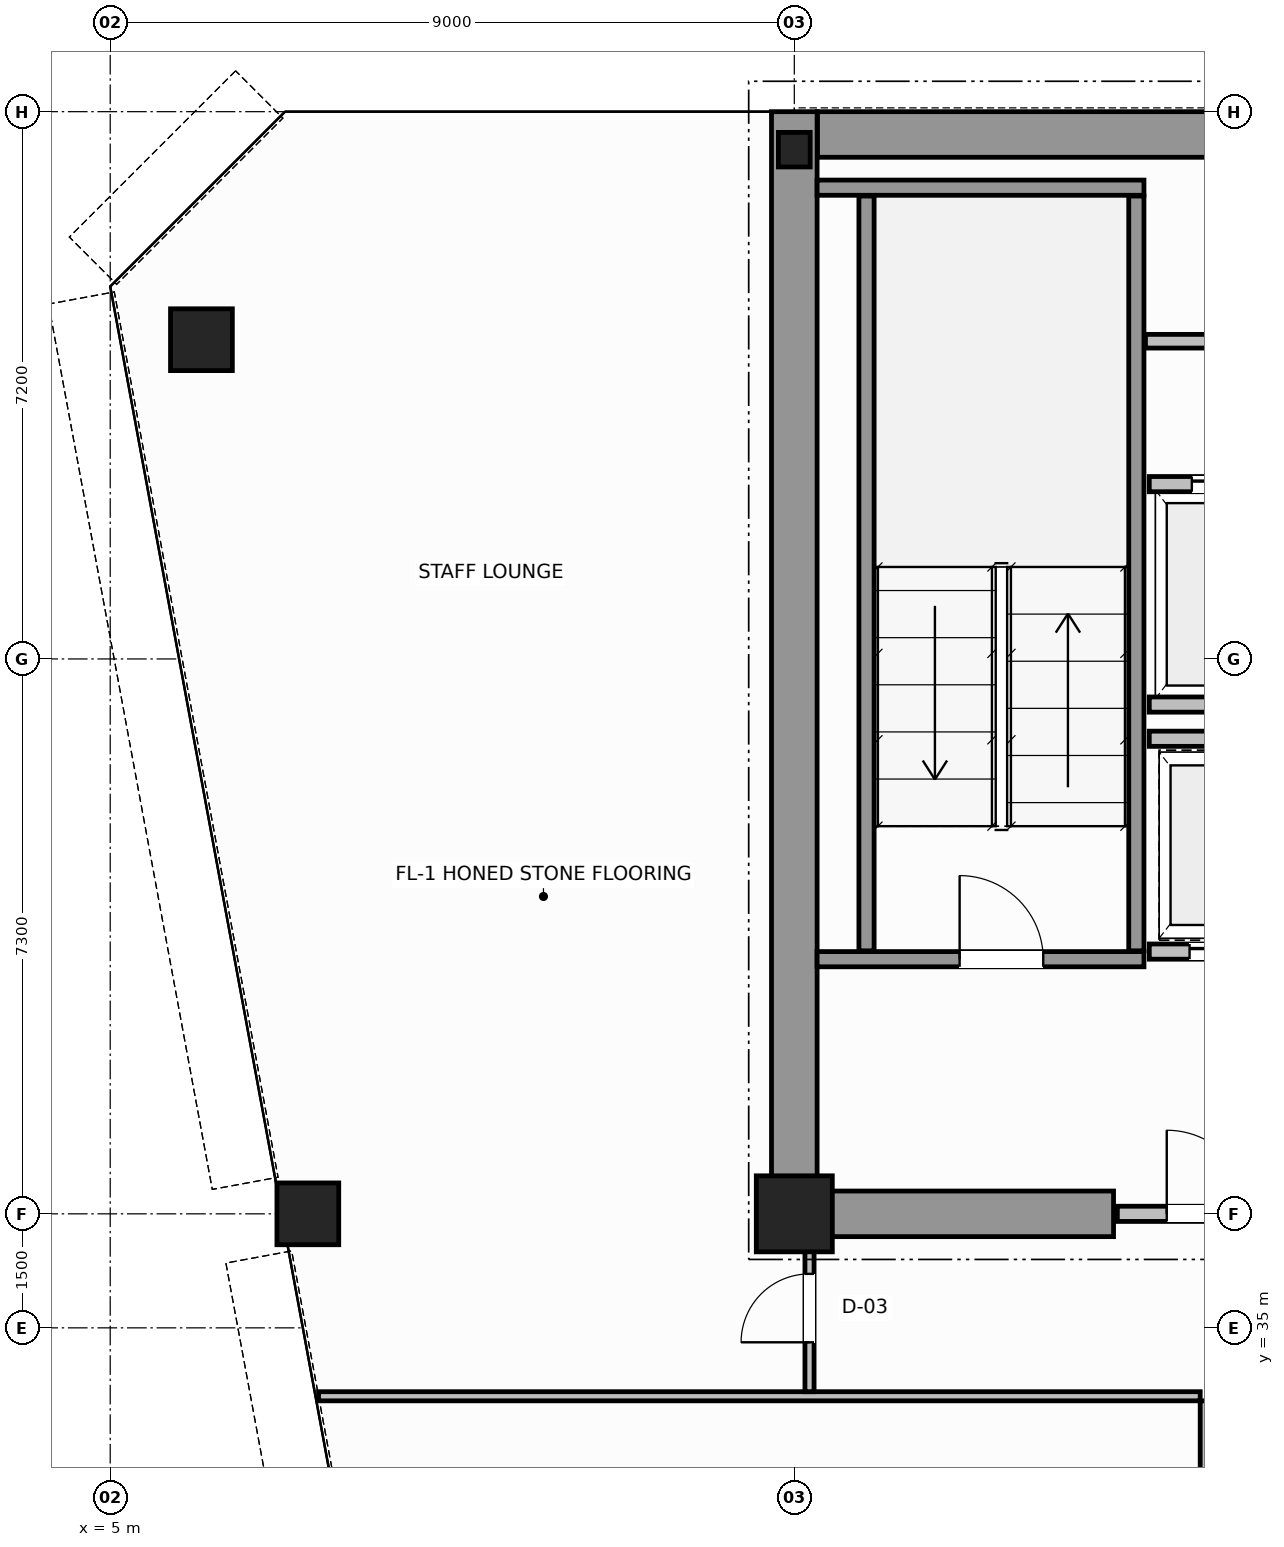
"""IFC4 building model, lengths in metres.
Left out: names, types, materials, properties, quantities, classifications, styles, units other than length and angle.
Written with IfcOpenShell. Run it as: python <this file> out.ifc"""

import sys

from ifc_helpers import new_model, si_unit, direction, frame, frame_2d, origin, origin_2d, place, context, subcontext, project, spatial, rectangle, hollow_circle, i_section, extrude, source, transform, mapped, element, fill, save


model = new_model("IFC4")
c1 = context("Model", 3, precision=1e-05, world=origin(), true_north=direction((0.0, 1.0)))
c2 = subcontext(c1, "Body", "Model", "MODEL_VIEW")
j1 = project(units=[si_unit("LENGTHUNIT", "METRE"), si_unit("PLANEANGLEUNIT", "RADIAN")], contexts=[c1])
p1 = place(None, origin())
s1 = spatial("IfcSite", under=j1, at=p1, CompositionType="ELEMENT")
p2 = place(p1, origin())
s2 = spatial("IfcBuilding", under=s1, at=p2, CompositionType="ELEMENT")
p3 = place(p2, frame((0.0, 0.0, 210.8)))
s3 = spatial("IfcBuildingStorey", under=s2, at=p3, CompositionType="ELEMENT", Elevation=210.8)
m1 = source(origin(), c2, "Body", "SweptSolid", [
    extrude(rectangle(XDim=1.0, YDim=1.0, at=origin_2d()), origin(), (0.0, 0.0, 1.0), 3.8),
])
p4 = place(p3, frame((14.0, 36.5, 0.0), z_axis=(0.0, 0.0, 1.0), x_axis=(1.0, 0.0, 0.0)))
e1 = element("IfcColumn", 1, at=p4, inside=s3, PredefinedType="COLUMN", context=c2, shape_type="MappedRepresentation", body=[
    mapped(m1, transform((0.0, 0.0, 0.0), scale=1.0)),
])
m2 = source(origin(), c2, "Body", "SweptSolid", [
    extrude(i_section(OverallWidth=0.418, OverallDepth=0.455, WebThickness=0.042, FlangeThickness=0.058, FilletRadius=0.015, at=origin_2d()), origin(), (0.0, 0.0, 1.0), 3.8),
])
p5 = place(p3, frame((14.0, 50.5, 0.0), z_axis=(0.0, 0.0, 1.0), x_axis=(1.0, 0.0, 0.0)))
e2 = element("IfcColumn", 2, at=p5, inside=s3, PredefinedType="COLUMN", context=c2, shape_type="MappedRepresentation", body=[
    mapped(m2, transform((0.0, 0.0, 0.0), scale=1.0)),
])
m3 = source(origin(), c2, "Body", "SweptSolid", [
    extrude(hollow_circle(Radius=0.406, WallThickness=0.04, at=origin_2d()), origin(), (0.0, 0.0, 1.0), 3.8),
])
for number, where, z_axis, x_axis in (
    (3, (6.2, 48.0, 0.0), (0.0, 0.0, 1.0), (1.0, 0.0, 0.0)),
    (4, (7.6, 36.5, 0.0), (0.0, 0.0, 1.0), (1.0, 0.0, 0.0)),
):
    element("IfcColumn", number, at=place(p3, frame(where, z_axis=z_axis, x_axis=x_axis)), inside=s3, PredefinedType="COLUMN", context=c2, shape_type="MappedRepresentation", body=[
        mapped(m3, transform((0.0, 0.0, 0.0), scale=1.0)),
    ])
p6 = place(p3, frame((14.304, 50.7, 0.0), z_axis=(0.0, 0.0, 1.0), x_axis=(1.0, 0.0, 0.0)))
e5 = element("IfcWall", 5, at=p6, inside=s3, PredefinedType="SHEAR", context=c2, shape_type="SweptSolid", body=[
    extrude(rectangle(XDim=19.694, YDim=0.6, at=frame_2d((9.847, 0.0))), origin(), (0.0, 0.0, 1.0), 3.8),
])
p7 = place(p3, frame((14.0, 36.5, 0.0), z_axis=(0.0, 0.0, 1.0), x_axis=(0.0, 1.0, 0.0)))
e6 = element("IfcWall", 6, at=p7, inside=s3, PredefinedType="SHEAR", context=c2, shape_type="SweptSolid", body=[
    extrude(rectangle(XDim=14.5, YDim=0.6, at=frame_2d((7.25, 0.0))), origin(), (0.0, 0.0, 1.0), 3.8),
])
p8 = place(p3, frame((14.32, 36.5, 0.0), z_axis=(0.0, 0.0, 1.0), x_axis=(1.0, 0.0, 0.0)))
e7 = element("IfcWall", 7, at=p8, inside=s3, PredefinedType="SHEAR", context=c2, shape_type="SweptSolid", body=[
    extrude(rectangle(XDim=3.88, YDim=0.6, at=frame_2d((1.94, 0.0))), origin(), (0.0, 0.0, 1.0), 2.58),
])
p9 = place(p3, frame((14.3, 39.85, 0.0), z_axis=(0.0, 0.0, 1.0), x_axis=(1.0, 0.0, 0.0)))
e8 = element("IfcWall", 8, at=p9, inside=s3, PredefinedType="SOLIDWALL", context=c2, shape_type="SweptSolid", body=[
    extrude(rectangle(XDim=4.3, YDim=0.2, at=frame_2d((2.15, 0.0))), origin(), (0.0, 0.0, 1.0), 3.8),
])
p10 = place(p9, frame((1.875, 0.0, 0.0)))
e9 = element("IfcOpeningElement", 9, at=p10, cuts=e8, PredefinedType="OPENING", context=c2, shape_type="SweptSolid", body=[
    extrude(rectangle(XDim=1.1, YDim=2.15, at=frame_2d((0.55, 1.075))), frame((0.0, 0.11, 0.0), z_axis=(0.0, -1.0, 0.0), x_axis=(1.0, 0.0, 0.0)), (0.0, 0.0, 1.0), 0.22),
])
p11 = place(p3, frame((14.3, 50.0, 0.0), z_axis=(0.0, 0.0, 1.0), x_axis=(1.0, 0.0, 0.0)))
e10 = element("IfcWall", 10, at=p11, inside=s3, PredefinedType="SOLIDWALL", context=c2, shape_type="SweptSolid", body=[
    extrude(rectangle(XDim=4.3, YDim=0.2, at=frame_2d((2.15, 0.0))), origin(), (0.0, 0.0, 1.0), 3.8),
])
for number, where, z_axis, x_axis in (
    (11, (14.95, 39.96, 0.0), (0.0, 0.0, 1.0), (0.0, 1.0, 0.0)),
    (12, (18.5, 39.96, 0.0), (0.0, 0.0, 1.0), (0.0, 1.0, 0.0)),
):
    element("IfcWall", number, at=place(p3, frame(where, z_axis=z_axis, x_axis=x_axis)), inside=s3, PredefinedType="SOLIDWALL", context=c2, shape_type="SweptSolid", body=[
        extrude(rectangle(XDim=9.93, YDim=0.2, at=frame_2d((4.965, 0.0))), origin(), (0.0, 0.0, 1.0), 3.8),
    ])
p12 = place(p3, frame((18.25, 36.5, 0.0), z_axis=(0.0, 0.0, 1.0), x_axis=(1.0, 0.0, 0.0)))
e13 = element("IfcWall", 13, at=p12, inside=s3, PredefinedType="SOLIDWALL", context=c2, shape_type="SweptSolid", body=[
    extrude(rectangle(XDim=2.47, YDim=0.2, at=frame_2d((1.235, 0.0))), origin(), (0.0, 0.0, 1.0), 2.57),
])
p13 = place(p12, frame((0.65, 0.0, 0.0)))
e14 = element("IfcOpeningElement", 14, at=p13, cuts=e13, PredefinedType="OPENING", context=c2, shape_type="SweptSolid", body=[
    extrude(rectangle(XDim=1.1, YDim=2.15, at=frame_2d((0.55, 1.075))), frame((0.0, 0.11, 0.0), z_axis=(0.0, -1.0, 0.0), x_axis=(1.0, 0.0, 0.0)), (0.0, 0.0, 1.0), 0.22),
])
p14 = place(p3, frame((18.67, 46.1, 0.0), z_axis=(0.0, 0.0, 1.0), x_axis=(1.0, 0.0, 0.0)))
e15 = element("IfcWall", 15, at=p14, inside=s3, PredefinedType="SOLIDWALL", context=c2, shape_type="SweptSolid", body=[
    extrude(rectangle(XDim=2.22, YDim=0.2, at=frame_2d((1.11, 0.0))), origin(), (0.0, 0.0, 1.0), 3.58),
])
p15 = place(p14, frame((0.56, 0.0, 0.0)))
e16 = element("IfcOpeningElement", 16, at=p15, cuts=e15, PredefinedType="OPENING", context=c2, shape_type="SweptSolid", body=[
    extrude(rectangle(XDim=1.1, YDim=2.15, at=frame_2d((0.55, 1.075))), frame((0.0, 0.11, 0.0), z_axis=(0.0, -1.0, 0.0), x_axis=(1.0, 0.0, 0.0)), (0.0, 0.0, 1.0), 0.22),
])
p16 = place(p3, frame((18.67, 43.2, 0.0), z_axis=(0.0, 0.0, 1.0), x_axis=(1.0, 0.0, 0.0)))
e17 = element("IfcWall", 17, at=p16, inside=s3, PredefinedType="SOLIDWALL", context=c2, shape_type="SweptSolid", body=[
    extrude(rectangle(XDim=2.22, YDim=0.2, at=frame_2d((1.11, 0.0))), origin(), (0.0, 0.0, 1.0), 3.58),
])
p17 = place(p3, frame((18.67, 39.95, 0.0), z_axis=(0.0, 0.0, 1.0), x_axis=(1.0, 0.0, 0.0)))
e18 = element("IfcWall", 18, at=p17, inside=s3, PredefinedType="SOLIDWALL", context=c2, shape_type="SweptSolid", body=[
    extrude(rectangle(XDim=2.16, YDim=0.2, at=frame_2d((1.08, 0.0))), origin(), (0.0, 0.0, 1.0), 3.58),
])
p18 = place(p17, frame((0.53, 0.0, 0.0)))
e19 = element("IfcOpeningElement", 19, at=p18, cuts=e18, PredefinedType="OPENING", context=c2, shape_type="SweptSolid", body=[
    extrude(rectangle(XDim=1.1, YDim=2.15, at=frame_2d((0.55, 1.075))), frame((0.0, 0.11, 0.0), z_axis=(0.0, -1.0, 0.0), x_axis=(1.0, 0.0, 0.0)), (0.0, 0.0, 1.0), 0.22),
])
p19 = place(p3, frame((18.67, 42.75, 0.0), z_axis=(0.0, 0.0, 1.0), x_axis=(1.0, 0.0, 0.0)))
e20 = element("IfcWall", 20, at=p19, inside=s3, PredefinedType="SOLIDWALL", context=c2, shape_type="SweptSolid", body=[
    extrude(rectangle(XDim=2.16, YDim=0.2, at=frame_2d((1.08, 0.0))), origin(), (0.0, 0.0, 1.0), 3.58),
])
p20 = place(p3, frame((18.62, 47.98, 0.0), z_axis=(0.0, 0.0, 1.0), x_axis=(1.0, 0.0, 0.0)))
e21 = element("IfcWall", 21, at=p20, inside=s3, PredefinedType="PLUMBINGWALL", context=c2, shape_type="SweptSolid", body=[
    extrude(rectangle(XDim=20.06, YDim=0.18, at=frame_2d((10.03, 0.0))), origin(), (0.0, 0.0, 1.0), 3.58),
])
p21 = place(p20, frame((3.5, 0.0, 0.0)))
e22 = element("IfcOpeningElement", 22, at=p21, cuts=e21, PredefinedType="OPENING", context=c2, shape_type="SweptSolid", body=[
    extrude(rectangle(XDim=0.9, YDim=2.15, at=frame_2d((0.45, 1.075))), frame((0.0, 0.1, 0.0), z_axis=(0.0, -1.0, 0.0), x_axis=(1.0, 0.0, 0.0)), (0.0, 0.0, 1.0), 0.2),
])
p22 = place(p20, frame((10.8, 0.0, 0.0)))
e23 = element("IfcOpeningElement", 23, at=p22, cuts=e21, PredefinedType="OPENING", context=c2, shape_type="SweptSolid", body=[
    extrude(rectangle(XDim=0.9, YDim=2.15, at=frame_2d((0.45, 1.075))), frame((0.0, 0.1, 0.0), z_axis=(0.0, -1.0, 0.0), x_axis=(1.0, 0.0, 0.0)), (0.0, 0.0, 1.0), 0.2),
])
p23 = place(p20, frame((16.8, 0.0, 0.0)))
e24 = element("IfcOpeningElement", 24, at=p23, cuts=e21, PredefinedType="OPENING", context=c2, shape_type="SweptSolid", body=[
    extrude(rectangle(XDim=0.9, YDim=2.15, at=frame_2d((0.45, 1.075))), frame((0.0, 0.1, 0.0), z_axis=(0.0, -1.0, 0.0), x_axis=(1.0, 0.0, 0.0)), (0.0, 0.0, 1.0), 0.2),
])
p24 = place(p3, frame((7.74, 34.1, 0.0), z_axis=(0.0, 0.0, 1.0), x_axis=(1.0, 0.0, 0.0)))
e25 = element("IfcWall", 25, at=p24, inside=s3, PredefinedType="PARTITIONING", context=c2, shape_type="SweptSolid", body=[
    extrude(rectangle(XDim=11.6, YDim=0.12, at=frame_2d((5.8, 0.0))), origin(), (0.0, 0.0, 1.0), 3.58),
])
p25 = place(p3, frame((14.2, 34.16, 0.0), z_axis=(0.0, 0.0, 1.0), x_axis=(0.0, 1.0, 0.0)))
e26 = element("IfcWall", 26, at=p25, inside=s3, PredefinedType="PARTITIONING", context=c2, shape_type="SweptSolid", body=[
    extrude(rectangle(XDim=2.28, YDim=0.12, at=frame_2d((1.14, 0.0))), origin(), (0.0, 0.0, 1.0), 3.58),
])
p26 = place(p25, frame((0.65, 0.0, 0.0)))
e27 = element("IfcOpeningElement", 27, at=p26, cuts=e26, PredefinedType="OPENING", context=c2, shape_type="SweptSolid", body=[
    extrude(rectangle(XDim=0.9, YDim=2.15, at=frame_2d((0.45, 1.075))), frame((0.0, 0.07, 0.0), z_axis=(0.0, -1.0, 0.0), x_axis=(1.0, 0.0, 0.0)), (0.0, 0.0, 1.0), 0.14),
])
p27 = place(p3, frame((19.4, 20.4, 0.0), z_axis=(0.0, 0.0, 1.0), x_axis=(0.0, 1.0, 0.0)))
e28 = element("IfcWall", 28, at=p27, inside=s3, PredefinedType="PARTITIONING", context=c2, shape_type="SweptSolid", body=[
    extrude(rectangle(XDim=13.64, YDim=0.12, at=frame_2d((6.82, 0.0))), origin(), (0.0, 0.0, 1.0), 3.58),
])
p28 = place(p27, frame((2.95, 0.0, 0.0)))
e29 = element("IfcOpeningElement", 29, at=p28, cuts=e28, PredefinedType="OPENING", context=c2, shape_type="SweptSolid", body=[
    extrude(rectangle(XDim=0.9, YDim=2.15, at=frame_2d((0.45, 1.075))), frame((0.0, 0.07, 0.0), z_axis=(0.0, -1.0, 0.0), x_axis=(1.0, 0.0, 0.0)), (0.0, 0.0, 1.0), 0.14),
])
p29 = place(p27, frame((9.77, 0.0, 0.0)))
e30 = element("IfcOpeningElement", 30, at=p29, cuts=e28, PredefinedType="OPENING", context=c2, shape_type="SweptSolid", body=[
    extrude(rectangle(XDim=0.9, YDim=2.15, at=frame_2d((0.45, 1.075))), frame((0.0, 0.07, 0.0), z_axis=(0.0, -1.0, 0.0), x_axis=(1.0, 0.0, 0.0)), (0.0, 0.0, 1.0), 0.14),
])
m4 = source(origin(), c2, "Body", "SweptSolid", [
    extrude(rectangle(XDim=1.1, YDim=2.15, at=frame_2d((0.55, 1.075))), frame((0.0, 0.025, 0.0), z_axis=(0.0, -1.0, 0.0), x_axis=(1.0, 0.0, 0.0)), (0.0, 0.0, 1.0), 0.05),
])
p30 = place(p10, origin())
e31 = element("IfcDoor", 31, at=p30, inside=s3, OperationType="SINGLE_SWING_LEFT", PredefinedType="DOOR", context=c2, shape_type="MappedRepresentation", body=[
    mapped(m4, transform((0.0, 0.0, 0.0), scale=1.0)),
])
fill(e9, e31)
p31 = place(p13, origin())
e32 = element("IfcDoor", 32, at=p31, inside=s3, OperationType="SINGLE_SWING_RIGHT", PredefinedType="DOOR", context=c2, shape_type="MappedRepresentation", body=[
    mapped(m4, transform((0.0, 0.0, 0.0), scale=1.0)),
])
fill(e14, e32)
p32 = place(p15, origin())
e33 = element("IfcDoor", 33, at=p32, inside=s3, OperationType="DOUBLE_DOOR_SLIDING", PredefinedType="DOOR", context=c2, shape_type="MappedRepresentation", body=[
    mapped(m4, transform((0.0, 0.0, 0.0), scale=1.0)),
])
fill(e16, e33)
p33 = place(p18, origin())
e34 = element("IfcDoor", 34, at=p33, inside=s3, OperationType="DOUBLE_DOOR_SLIDING", PredefinedType="DOOR", context=c2, shape_type="MappedRepresentation", body=[
    mapped(m4, transform((0.0, 0.0, 0.0), scale=1.0)),
])
fill(e19, e34)
m5 = source(origin(), c2, "Body", "SweptSolid", [
    extrude(rectangle(XDim=0.9, YDim=2.15, at=frame_2d((0.45, 1.075))), frame((0.0, 0.025, 0.0), z_axis=(0.0, -1.0, 0.0), x_axis=(1.0, 0.0, 0.0)), (0.0, 0.0, 1.0), 0.05),
])
p34 = place(p26, origin())
e35 = element("IfcDoor", 35, at=p34, inside=s3, OperationType="SINGLE_SWING_LEFT", PredefinedType="DOOR", context=c2, shape_type="MappedRepresentation", body=[
    mapped(m5, transform((0.0, 0.0, 0.0), scale=1.0)),
])
fill(e27, e35)
save(model, sys.argv[1])
